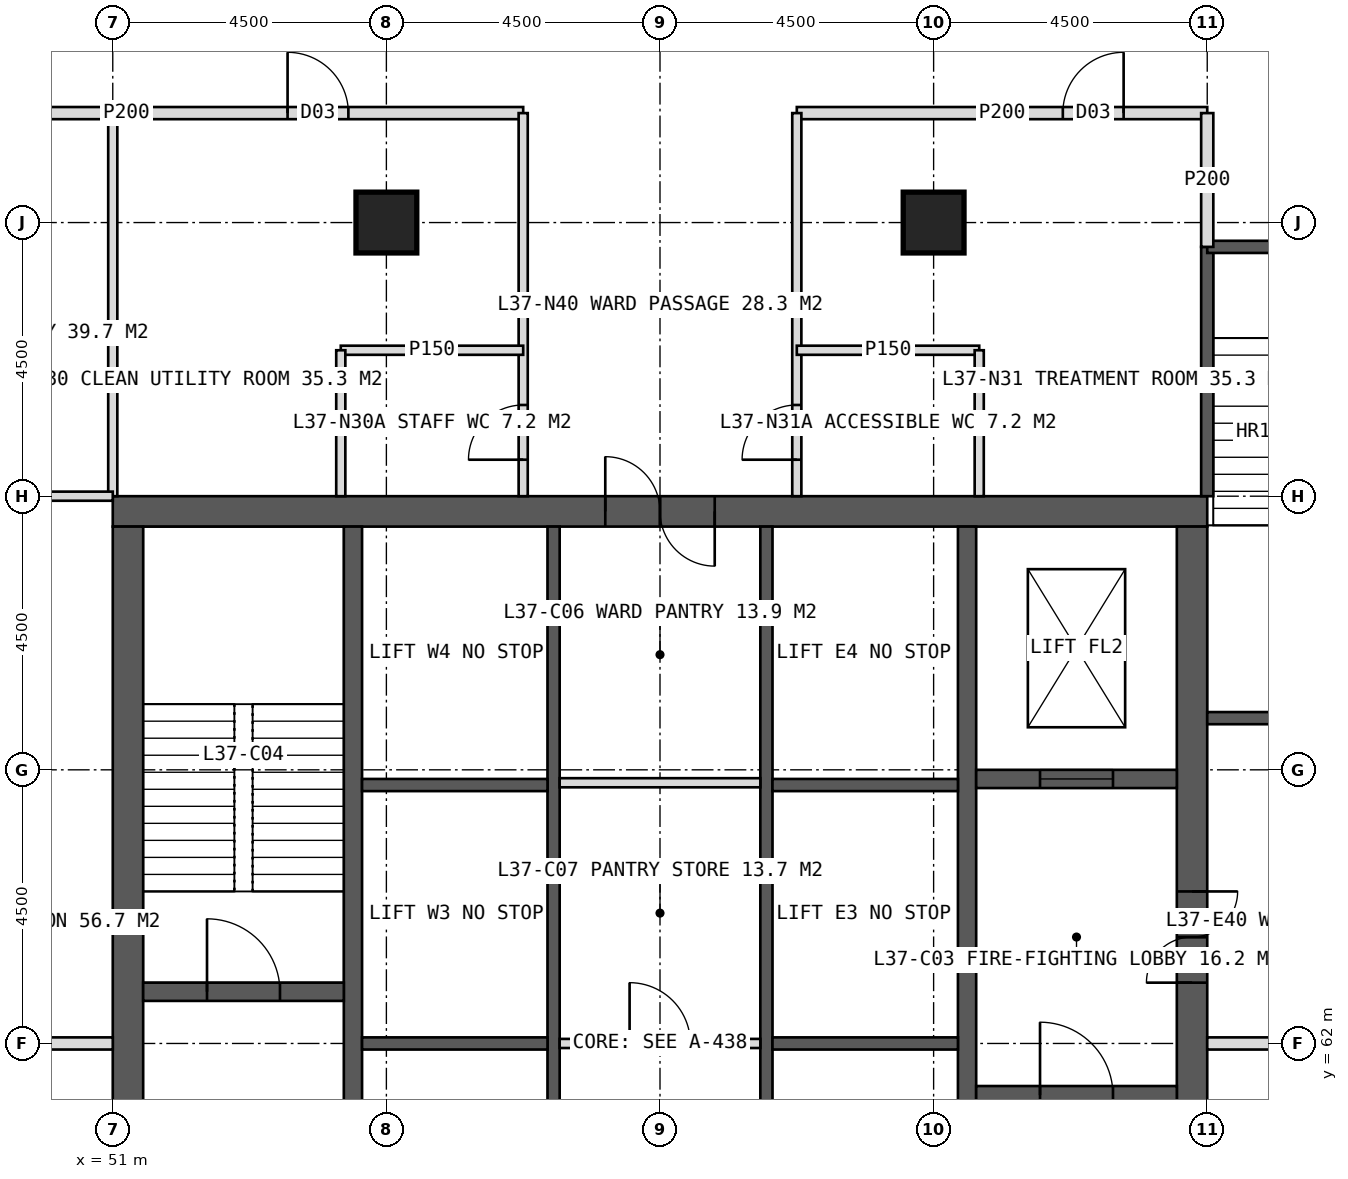
"""IFC4 building model, lengths in metres.
Left out: names, types, materials, properties, quantities, classifications, styles, units other than length and angle.
Written with IfcOpenShell. Run it as: python <this file> out.ifc"""

import sys

from ifc_helpers import new_model, si_unit, direction, frame, frame_2d, origin, origin_2d, place, context, subcontext, project, spatial, rectangle, hollow_rectangle, extrude, element, fill, save


model = new_model("IFC4")
c1 = context("Model", 3, precision=1e-05, world=origin(), true_north=direction((0.0, 1.0)))
c2 = subcontext(c1, "Body", "Model", "MODEL_VIEW")
j1 = project(units=[si_unit("LENGTHUNIT", "METRE"), si_unit("PLANEANGLEUNIT", "RADIAN")], contexts=[c1])
p1 = place(None, origin())
s1 = spatial("IfcSite", under=j1, at=p1, CompositionType="ELEMENT")
p2 = place(p1, origin())
s2 = spatial("IfcBuilding", under=s1, at=p2, CompositionType="ELEMENT")
p3 = place(p2, frame((0.0, 0.0, 156.0)))
s3 = spatial("IfcBuildingStorey", under=s2, at=p3, CompositionType="ELEMENT", Elevation=156.0)
p4 = place(p3, frame((51.0, 70.75, 0.0), z_axis=(0.0, 0.0, 1.0), x_axis=(1.0, 0.0, 0.0)))
e1 = element("IfcWall", 1, at=p4, inside=s3, PredefinedType="SHEAR", context=c2, shape_type="SweptSolid", body=[
    extrude(rectangle(XDim=18.0, YDim=0.5, at=frame_2d((9.0, 0.0))), origin(), (0.0, 0.0, 1.0), 4.0),
])
p5 = place(p4, frame((8.1, 0.0, 0.0)))
e2 = element("IfcOpeningElement", 2, at=p5, cuts=e1, PredefinedType="OPENING", context=c2, shape_type="SweptSolid", body=[
    extrude(rectangle(XDim=1.8, YDim=2.2, at=frame_2d((0.9, 1.1))), frame((0.0, 0.26, 0.0), z_axis=(0.0, -1.0, 0.0), x_axis=(1.0, 0.0, 0.0)), (0.0, 0.0, 1.0), 0.52),
])
p6 = place(p3, frame((51.25, 53.5, 0.0), z_axis=(0.0, 0.0, 1.0), x_axis=(0.0, 1.0, 0.0)))
e3 = element("IfcWall", 3, at=p6, inside=s3, PredefinedType="SHEAR", context=c2, shape_type="SweptSolid", body=[
    extrude(rectangle(XDim=17.0, YDim=0.5, at=frame_2d((8.5, 0.0))), origin(), (0.0, 0.0, 1.0), 4.0),
])
p7 = place(p6, frame((6.0, 0.0, 0.0)))
e4 = element("IfcOpeningElement", 4, at=p7, cuts=e3, PredefinedType="OPENING", context=c2, shape_type="SweptSolid", body=[
    extrude(rectangle(XDim=1.5, YDim=2.2, at=frame_2d((0.75, 1.1))), frame((0.0, 0.26, 0.0), z_axis=(0.0, -1.0, 0.0), x_axis=(1.0, 0.0, 0.0)), (0.0, 0.0, 1.0), 0.52),
])
p8 = place(p3, frame((68.75, 53.5, 0.0), z_axis=(0.0, 0.0, 1.0), x_axis=(0.0, 1.0, 0.0)))
e5 = element("IfcWall", 5, at=p8, inside=s3, PredefinedType="SHEAR", context=c2, shape_type="SweptSolid", body=[
    extrude(rectangle(XDim=17.0, YDim=0.5, at=frame_2d((8.5, 0.0))), origin(), (0.0, 0.0, 1.0), 4.0),
])
p9 = place(p8, frame((9.5, 0.0, 0.0)))
e6 = element("IfcOpeningElement", 6, at=p9, cuts=e5, PredefinedType="OPENING", context=c2, shape_type="SweptSolid", body=[
    extrude(rectangle(XDim=1.5, YDim=2.2, at=frame_2d((0.75, 1.1))), frame((0.0, 0.26, 0.0), z_axis=(0.0, -1.0, 0.0), x_axis=(1.0, 0.0, 0.0)), (0.0, 0.0, 1.0), 0.52),
])
for number, where, z_axis, x_axis in (
    (7, (54.95, 53.5, 0.0), (0.0, 0.0, 1.0), (0.0, 1.0, 0.0)),
    (8, (65.05, 53.5, 0.0), (0.0, 0.0, 1.0), (0.0, 1.0, 0.0)),
):
    element("IfcWall", number, at=place(p3, frame(where, z_axis=z_axis, x_axis=x_axis)), inside=s3, PredefinedType="SHEAR", context=c2, shape_type="SweptSolid", body=[
        extrude(rectangle(XDim=17.0, YDim=0.3, at=frame_2d((8.5, 0.0))), origin(), (0.0, 0.0, 1.0), 4.0),
    ])
p10 = place(p3, frame((58.25, 53.5, 0.0), z_axis=(0.0, 0.0, 1.0), x_axis=(0.0, 1.0, 0.0)))
e9 = element("IfcWall", 9, at=p10, inside=s3, PredefinedType="SHEAR", context=c2, shape_type="SweptSolid", body=[
    extrude(rectangle(XDim=17.0, YDim=0.2, at=frame_2d((8.5, 0.0))), origin(), (0.0, 0.0, 1.0), 4.0),
])
p11 = place(p10, frame((1.375, 0.0, 0.0)))
e10 = element("IfcOpeningElement", 10, at=p11, cuts=e9, PredefinedType="OPENING", context=c2, shape_type="SweptSolid", body=[
    extrude(rectangle(XDim=1.4, YDim=2.2, at=frame_2d((0.7, 1.1))), frame((0.0, 0.11, 0.0), z_axis=(0.0, -1.0, 0.0), x_axis=(1.0, 0.0, 0.0)), (0.0, 0.0, 1.0), 0.22),
])
p12 = place(p10, frame((5.675, 0.0, 0.0)))
e11 = element("IfcOpeningElement", 11, at=p12, cuts=e9, PredefinedType="OPENING", context=c2, shape_type="SweptSolid", body=[
    extrude(rectangle(XDim=1.4, YDim=2.2, at=frame_2d((0.7, 1.1))), frame((0.0, 0.11, 0.0), z_axis=(0.0, -1.0, 0.0), x_axis=(1.0, 0.0, 0.0)), (0.0, 0.0, 1.0), 0.22),
])
p13 = place(p3, frame((61.75, 53.5, 0.0), z_axis=(0.0, 0.0, 1.0), x_axis=(0.0, 1.0, 0.0)))
e12 = element("IfcWall", 12, at=p13, inside=s3, PredefinedType="SHEAR", context=c2, shape_type="SweptSolid", body=[
    extrude(rectangle(XDim=17.0, YDim=0.2, at=frame_2d((8.5, 0.0))), origin(), (0.0, 0.0, 1.0), 4.0),
])
p14 = place(p13, frame((1.375, 0.0, 0.0)))
e13 = element("IfcOpeningElement", 13, at=p14, cuts=e12, PredefinedType="OPENING", context=c2, shape_type="SweptSolid", body=[
    extrude(rectangle(XDim=1.4, YDim=2.2, at=frame_2d((0.7, 1.1))), frame((0.0, 0.11, 0.0), z_axis=(0.0, -1.0, 0.0), x_axis=(1.0, 0.0, 0.0)), (0.0, 0.0, 1.0), 0.22),
])
p15 = place(p13, frame((5.675, 0.0, 0.0)))
e14 = element("IfcOpeningElement", 14, at=p15, cuts=e12, PredefinedType="OPENING", context=c2, shape_type="SweptSolid", body=[
    extrude(rectangle(XDim=1.4, YDim=2.2, at=frame_2d((0.7, 1.1))), frame((0.0, 0.11, 0.0), z_axis=(0.0, -1.0, 0.0), x_axis=(1.0, 0.0, 0.0)), (0.0, 0.0, 1.0), 0.22),
])
for number, where, z_axis, x_axis in (
    (15, (55.1, 62.0, 0.0), (0.0, 0.0, 1.0), (1.0, 0.0, 0.0)),
    (16, (61.85, 62.0, 0.0), (0.0, 0.0, 1.0), (1.0, 0.0, 0.0)),
    (17, (55.1, 66.25, 0.0), (0.0, 0.0, 1.0), (1.0, 0.0, 0.0)),
    (18, (61.85, 66.25, 0.0), (0.0, 0.0, 1.0), (1.0, 0.0, 0.0)),
):
    element("IfcWall", number, at=place(p3, frame(where, z_axis=z_axis, x_axis=x_axis)), inside=s3, PredefinedType="SHEAR", context=c2, shape_type="SweptSolid", body=[
        extrude(rectangle(XDim=3.05, YDim=0.2, at=frame_2d((1.525, 0.0))), origin(), (0.0, 0.0, 1.0), 4.0),
    ])
p16 = place(p3, frame((51.5, 62.85, 0.0), z_axis=(0.0, 0.0, 1.0), x_axis=(1.0, 0.0, 0.0)))
e19 = element("IfcWall", 19, at=p16, inside=s3, PredefinedType="SHEAR", context=c2, shape_type="SweptSolid", body=[
    extrude(rectangle(XDim=3.3, YDim=0.3, at=frame_2d((1.65, 0.0))), origin(), (0.0, 0.0, 1.0), 4.0),
])
p17 = place(p16, frame((1.05, 0.0, 0.0)))
e20 = element("IfcOpeningElement", 20, at=p17, cuts=e19, PredefinedType="OPENING", context=c2, shape_type="SweptSolid", body=[
    extrude(rectangle(XDim=1.2, YDim=2.1, at=frame_2d((0.6, 1.05))), frame((0.0, 0.16, 0.0), z_axis=(0.0, -1.0, 0.0), x_axis=(1.0, 0.0, 0.0)), (0.0, 0.0, 1.0), 0.32),
])
p18 = place(p3, frame((65.2, 61.15, 0.0), z_axis=(0.0, 0.0, 1.0), x_axis=(1.0, 0.0, 0.0)))
e21 = element("IfcWall", 21, at=p18, inside=s3, PredefinedType="SHEAR", context=c2, shape_type="SweptSolid", body=[
    extrude(rectangle(XDim=3.3, YDim=0.3, at=frame_2d((1.65, 0.0))), origin(), (0.0, 0.0, 1.0), 4.0),
])
p19 = place(p18, frame((1.05, 0.0, 0.0)))
e22 = element("IfcOpeningElement", 22, at=p19, cuts=e21, PredefinedType="OPENING", context=c2, shape_type="SweptSolid", body=[
    extrude(rectangle(XDim=1.2, YDim=2.1, at=frame_2d((0.6, 1.05))), frame((0.0, 0.16, 0.0), z_axis=(0.0, -1.0, 0.0), x_axis=(1.0, 0.0, 0.0)), (0.0, 0.0, 1.0), 0.32),
])
p20 = place(p3, frame((65.2, 66.35, 0.0), z_axis=(0.0, 0.0, 1.0), x_axis=(1.0, 0.0, 0.0)))
e23 = element("IfcWall", 23, at=p20, inside=s3, PredefinedType="SHEAR", context=c2, shape_type="SweptSolid", body=[
    extrude(rectangle(XDim=3.3, YDim=0.3, at=frame_2d((1.65, 0.0))), origin(), (0.0, 0.0, 1.0), 4.0),
])
p21 = place(p20, frame((1.05, 0.0, 0.0)))
e24 = element("IfcOpeningElement", 24, at=p21, cuts=e23, PredefinedType="OPENING", context=c2, shape_type="SweptSolid", body=[
    extrude(rectangle(XDim=1.2, YDim=2.2, at=frame_2d((0.6, 1.1))), frame((0.0, 0.16, 0.0), z_axis=(0.0, -1.0, 0.0), x_axis=(1.0, 0.0, 0.0)), (0.0, 0.0, 1.0), 0.32),
])
for number, where, z_axis, x_axis in (
    (25, (55.5, 75.5, 0.0), (0.0, 0.0, 1.0), (1.0, 0.0, 0.0)),
    (26, (64.5, 75.5, 0.0), (0.0, 0.0, 1.0), (1.0, 0.0, 0.0)),
):
    element("IfcColumn", number, at=place(p3, frame(where, z_axis=z_axis, x_axis=x_axis)), inside=s3, PredefinedType="COLUMN", context=c2, shape_type="SweptSolid", body=[
        extrude(hollow_rectangle(XDim=1.0, YDim=1.0, WallThickness=0.1, at=origin_2d()), origin(), (0.0, 0.0, 1.0), 4.0),
    ])
p22 = place(p3, frame((51.0, 71.0, 0.0), z_axis=(0.0, 0.0, 1.0), x_axis=(0.0, 1.0, 0.0)))
e27 = element("IfcWall", 27, at=p22, inside=s3, PredefinedType="PARTITIONING", context=c2, shape_type="SweptSolid", body=[
    extrude(rectangle(XDim=6.3, YDim=0.15, at=frame_2d((3.15, 0.0))), origin(), (0.0, 0.0, 1.0), 3.75),
])
p23 = place(p3, frame((44.7, 77.3, 0.0), z_axis=(0.0, 0.0, 1.0), x_axis=(1.0, 0.0, 0.0)))
e28 = element("IfcWall", 28, at=p23, inside=s3, PredefinedType="PARTITIONING", context=c2, shape_type="SweptSolid", body=[
    extrude(rectangle(XDim=13.05, YDim=0.2, at=frame_2d((6.525, 0.0))), origin(), (0.0, 0.0, 1.0), 3.75),
])
p24 = place(p23, frame((9.175, 0.0, 0.0)))
e29 = element("IfcOpeningElement", 29, at=p24, cuts=e28, PredefinedType="OPENING", context=c2, shape_type="SweptSolid", body=[
    extrude(rectangle(XDim=1.0, YDim=2.1, at=frame_2d((0.5, 1.05))), frame((0.0, 0.11, 0.0), z_axis=(0.0, -1.0, 0.0), x_axis=(1.0, 0.0, 0.0)), (0.0, 0.0, 1.0), 0.22),
])
p25 = place(p3, frame((62.25, 77.3, 0.0), z_axis=(0.0, 0.0, 1.0), x_axis=(1.0, 0.0, 0.0)))
e30 = element("IfcWall", 30, at=p25, inside=s3, PredefinedType="PARTITIONING", context=c2, shape_type="SweptSolid", body=[
    extrude(rectangle(XDim=6.75, YDim=0.2, at=frame_2d((3.375, 0.0))), origin(), (0.0, 0.0, 1.0), 3.75),
])
p26 = place(p25, frame((4.375, 0.0, 0.0)))
e31 = element("IfcOpeningElement", 31, at=p26, cuts=e30, PredefinedType="OPENING", context=c2, shape_type="SweptSolid", body=[
    extrude(rectangle(XDim=1.0, YDim=2.1, at=frame_2d((0.5, 1.05))), frame((0.0, 0.11, 0.0), z_axis=(0.0, -1.0, 0.0), x_axis=(1.0, 0.0, 0.0)), (0.0, 0.0, 1.0), 0.22),
])
p27 = place(p3, frame((57.75, 71.0, 0.0), z_axis=(0.0, 0.0, 1.0), x_axis=(0.0, 1.0, 0.0)))
e32 = element("IfcWall", 32, at=p27, inside=s3, PredefinedType="PARTITIONING", context=c2, shape_type="SweptSolid", body=[
    extrude(rectangle(XDim=6.3, YDim=0.15, at=frame_2d((3.15, 0.0))), origin(), (0.0, 0.0, 1.0), 3.75),
])
p28 = place(p27, frame((0.6, 0.0, 0.0)))
e33 = element("IfcOpeningElement", 33, at=p28, cuts=e32, PredefinedType="OPENING", context=c2, shape_type="SweptSolid", body=[
    extrude(rectangle(XDim=0.9, YDim=2.1, at=frame_2d((0.45, 1.05))), frame((0.0, 0.085, 0.0), z_axis=(0.0, -1.0, 0.0), x_axis=(1.0, 0.0, 0.0)), (0.0, 0.0, 1.0), 0.17),
])
p29 = place(p3, frame((62.25, 71.0, 0.0), z_axis=(0.0, 0.0, 1.0), x_axis=(0.0, 1.0, 0.0)))
e34 = element("IfcWall", 34, at=p29, inside=s3, PredefinedType="PARTITIONING", context=c2, shape_type="SweptSolid", body=[
    extrude(rectangle(XDim=6.3, YDim=0.15, at=frame_2d((3.15, 0.0))), origin(), (0.0, 0.0, 1.0), 3.75),
])
p30 = place(p29, frame((0.6, 0.0, 0.0)))
e35 = element("IfcOpeningElement", 35, at=p30, cuts=e34, PredefinedType="OPENING", context=c2, shape_type="SweptSolid", body=[
    extrude(rectangle(XDim=0.9, YDim=2.1, at=frame_2d((0.45, 1.05))), frame((0.0, 0.085, 0.0), z_axis=(0.0, -1.0, 0.0), x_axis=(1.0, 0.0, 0.0)), (0.0, 0.0, 1.0), 0.17),
])
p31 = place(p3, frame((54.75, 73.4, 0.0), z_axis=(0.0, 0.0, 1.0), x_axis=(1.0, 0.0, 0.0)))
e36 = element("IfcWall", 36, at=p31, inside=s3, PredefinedType="PARTITIONING", context=c2, shape_type="SweptSolid", body=[
    extrude(rectangle(XDim=3.0, YDim=0.15, at=frame_2d((1.5, 0.0))), origin(), (0.0, 0.0, 1.0), 3.75),
])
p32 = place(p3, frame((54.75, 71.0, 0.0), z_axis=(0.0, 0.0, 1.0), x_axis=(0.0, 1.0, 0.0)))
e37 = element("IfcWall", 37, at=p32, inside=s3, PredefinedType="PARTITIONING", context=c2, shape_type="SweptSolid", body=[
    extrude(rectangle(XDim=2.4, YDim=0.15, at=frame_2d((1.2, 0.0))), origin(), (0.0, 0.0, 1.0), 3.75),
])
p33 = place(p3, frame((62.25, 73.4, 0.0), z_axis=(0.0, 0.0, 1.0), x_axis=(1.0, 0.0, 0.0)))
e38 = element("IfcWall", 38, at=p33, inside=s3, PredefinedType="PARTITIONING", context=c2, shape_type="SweptSolid", body=[
    extrude(rectangle(XDim=3.0, YDim=0.15, at=frame_2d((1.5, 0.0))), origin(), (0.0, 0.0, 1.0), 3.75),
])
p34 = place(p3, frame((65.25, 71.0, 0.0), z_axis=(0.0, 0.0, 1.0), x_axis=(0.0, 1.0, 0.0)))
e39 = element("IfcWall", 39, at=p34, inside=s3, PredefinedType="PARTITIONING", context=c2, shape_type="SweptSolid", body=[
    extrude(rectangle(XDim=2.4, YDim=0.15, at=frame_2d((1.2, 0.0))), origin(), (0.0, 0.0, 1.0), 3.75),
])
p35 = place(p3, frame((51.0, 62.0, 0.0), z_axis=(0.0, 0.0, 1.0), x_axis=(-1.0, 0.0, 0.0)))
e40 = element("IfcWall", 40, at=p35, inside=s3, PredefinedType="SOLIDWALL", context=c2, shape_type="SweptSolid", body=[
    extrude(rectangle(XDim=6.3, YDim=0.2, at=frame_2d((3.15, 0.0))), origin(), (0.0, 0.0, 1.0), 2.95),
])
p36 = place(p3, frame((51.0, 71.0, 0.0), z_axis=(0.0, 0.0, 1.0), x_axis=(-1.0, 0.0, 0.0)))
e41 = element("IfcWall", 41, at=p36, inside=s3, PredefinedType="PARTITIONING", context=c2, shape_type="SweptSolid", body=[
    extrude(rectangle(XDim=6.3, YDim=0.15, at=frame_2d((3.15, 0.0))), origin(), (0.0, 0.0, 1.0), 3.75),
])
p37 = place(p3, frame((69.0, 62.0, 0.0), z_axis=(0.0, 0.0, 1.0), x_axis=(1.0, 0.0, 0.0)))
e42 = element("IfcWall", 42, at=p37, inside=s3, PredefinedType="SOLIDWALL", context=c2, shape_type="SweptSolid", body=[
    extrude(rectangle(XDim=6.3, YDim=0.2, at=frame_2d((3.15, 0.0))), origin(), (0.0, 0.0, 1.0), 2.95),
])
p38 = place(p3, frame((58.35, 62.0, 0.0), z_axis=(0.0, 0.0, 1.0), x_axis=(1.0, 0.0, 0.0)))
e43 = element("IfcWall", 43, at=p38, inside=s3, PredefinedType="PARTITIONING", context=c2, shape_type="SweptSolid", body=[
    extrude(rectangle(XDim=3.3, YDim=0.15, at=frame_2d((1.65, 0.0))), origin(), (0.0, 0.0, 1.0), 3.75),
])
p39 = place(p38, frame((1.15, 0.0, 0.0)))
e44 = element("IfcOpeningElement", 44, at=p39, cuts=e43, PredefinedType="OPENING", context=c2, shape_type="SweptSolid", body=[
    extrude(rectangle(XDim=1.0, YDim=2.1, at=frame_2d((0.5, 1.05))), frame((0.0, 0.085, 0.0), z_axis=(0.0, -1.0, 0.0), x_axis=(1.0, 0.0, 0.0)), (0.0, 0.0, 1.0), 0.17),
])
p40 = place(p3, frame((58.35, 66.288, 0.0), z_axis=(0.0, 0.0, 1.0), x_axis=(1.0, 0.0, 0.0)))
e45 = element("IfcWall", 45, at=p40, inside=s3, PredefinedType="PARTITIONING", context=c2, shape_type="SweptSolid", body=[
    extrude(rectangle(XDim=3.3, YDim=0.15, at=frame_2d((1.65, 0.0))), origin(), (0.0, 0.0, 1.0), 3.75),
])
p41 = place(p3, frame((69.0, 71.0, 0.0), z_axis=(0.0, 0.0, 1.0), x_axis=(0.0, 1.0, 0.0)))
e46 = element("IfcWall", 46, at=p41, inside=s3, PredefinedType="SOLIDWALL", context=c2, shape_type="SweptSolid", body=[
    extrude(rectangle(XDim=4.1, YDim=0.2, at=frame_2d((2.05, 0.0))), origin(), (0.0, 0.0, 1.0), 3.75),
])
p42 = place(p3, frame((69.0, 67.35, 0.0), z_axis=(0.0, 0.0, 1.0), x_axis=(1.0, 0.0, 0.0)))
e47 = element("IfcWall", 47, at=p42, inside=s3, PredefinedType="SOLIDWALL", context=c2, shape_type="SweptSolid", body=[
    extrude(rectangle(XDim=3.5, YDim=0.2, at=frame_2d((1.75, 0.0))), origin(), (0.0, 0.0, 1.0), 3.75),
])
p43 = place(p3, frame((69.0, 75.1, 0.0), z_axis=(0.0, 0.0, 1.0), x_axis=(1.0, 0.0, 0.0)))
e48 = element("IfcWall", 48, at=p43, inside=s3, PredefinedType="SOLIDWALL", context=c2, shape_type="SweptSolid", body=[
    extrude(rectangle(XDim=3.5, YDim=0.2, at=frame_2d((1.75, 0.0))), origin(), (0.0, 0.0, 1.0), 3.75),
])
p44 = place(p43, frame((1.15, 0.0, 0.0)))
e49 = element("IfcOpeningElement", 49, at=p44, cuts=e48, PredefinedType="OPENING", context=c2, shape_type="SweptSolid", body=[
    extrude(rectangle(XDim=1.2, YDim=2.1, at=frame_2d((0.6, 1.05))), frame((0.0, 0.11, 0.0), z_axis=(0.0, -1.0, 0.0), x_axis=(1.0, 0.0, 0.0)), (0.0, 0.0, 1.0), 0.22),
])
p45 = place(p3, frame((69.0, 75.1, 0.0), z_axis=(0.0, 0.0, 1.0), x_axis=(0.0, 1.0, 0.0)))
e50 = element("IfcWall", 50, at=p45, inside=s3, PredefinedType="PARTITIONING", context=c2, shape_type="SweptSolid", body=[
    extrude(rectangle(XDim=2.2, YDim=0.2, at=frame_2d((1.1, 0.0))), origin(), (0.0, 0.0, 1.0), 3.75),
])
p46 = place(p28, origin())
e51 = element("IfcDoor", 51, at=p46, inside=s3, OperationType="SINGLE_SWING_LEFT", PredefinedType="DOOR", context=c2, shape_type="SweptSolid", body=[
    extrude(rectangle(XDim=0.9, YDim=2.1, at=frame_2d((0.45, 1.05))), frame((0.0, 0.025, 0.0), z_axis=(0.0, -1.0, 0.0), x_axis=(1.0, 0.0, 0.0)), (0.0, 0.0, 1.0), 0.05),
])
fill(e33, e51)
p47 = place(p24, origin())
e52 = element("IfcDoor", 52, at=p47, inside=s3, OperationType="SINGLE_SWING_LEFT", PredefinedType="DOOR", context=c2, shape_type="SweptSolid", body=[
    extrude(rectangle(XDim=1.0, YDim=2.1, at=frame_2d((0.5, 1.05))), frame((0.0, 0.025, 0.0), z_axis=(0.0, -1.0, 0.0), x_axis=(1.0, 0.0, 0.0)), (0.0, 0.0, 1.0), 0.05),
])
fill(e29, e52)
p48 = place(p30, origin())
e53 = element("IfcDoor", 53, at=p48, inside=s3, OperationType="SINGLE_SWING_LEFT", PredefinedType="DOOR", context=c2, shape_type="SweptSolid", body=[
    extrude(rectangle(XDim=0.9, YDim=2.1, at=frame_2d((0.45, 1.05))), frame((0.0, 0.025, 0.0), z_axis=(0.0, -1.0, 0.0), x_axis=(1.0, 0.0, 0.0)), (0.0, 0.0, 1.0), 0.05),
])
fill(e35, e53)
p49 = place(p26, origin())
e54 = element("IfcDoor", 54, at=p49, inside=s3, OperationType="SINGLE_SWING_RIGHT", PredefinedType="DOOR", context=c2, shape_type="SweptSolid", body=[
    extrude(rectangle(XDim=1.0, YDim=2.1, at=frame_2d((0.5, 1.05))), frame((0.0, 0.025, 0.0), z_axis=(0.0, -1.0, 0.0), x_axis=(1.0, 0.0, 0.0)), (0.0, 0.0, 1.0), 0.05),
])
fill(e31, e54)
p50 = place(p9, origin())
e55 = element("IfcDoor", 55, at=p50, inside=s3, OperationType="DOUBLE_DOOR_SINGLE_SWING", PredefinedType="DOOR", context=c2, shape_type="SweptSolid", body=[
    extrude(rectangle(XDim=1.5, YDim=2.2, at=frame_2d((0.75, 1.1))), frame((0.0, 0.025, 0.0), z_axis=(0.0, -1.0, 0.0), x_axis=(1.0, 0.0, 0.0)), (0.0, 0.0, 1.0), 0.05),
])
fill(e6, e55)
p51 = place(p17, origin())
e56 = element("IfcDoor", 56, at=p51, inside=s3, OperationType="SINGLE_SWING_LEFT", PredefinedType="DOOR", context=c2, shape_type="SweptSolid", body=[
    extrude(rectangle(XDim=1.2, YDim=2.1, at=frame_2d((0.6, 1.05))), frame((0.0, 0.025, 0.0), z_axis=(0.0, -1.0, 0.0), x_axis=(1.0, 0.0, 0.0)), (0.0, 0.0, 1.0), 0.05),
])
fill(e20, e56)
p52 = place(p19, origin())
e57 = element("IfcDoor", 57, at=p52, inside=s3, OperationType="SINGLE_SWING_LEFT", PredefinedType="DOOR", context=c2, shape_type="SweptSolid", body=[
    extrude(rectangle(XDim=1.2, YDim=2.1, at=frame_2d((0.6, 1.05))), frame((0.0, 0.025, 0.0), z_axis=(0.0, -1.0, 0.0), x_axis=(1.0, 0.0, 0.0)), (0.0, 0.0, 1.0), 0.05),
])
fill(e22, e57)
p53 = place(p21, origin())
e58 = element("IfcDoor", 58, at=p53, inside=s3, OperationType="SLIDING_TO_LEFT", PredefinedType="DOOR", context=c2, shape_type="SweptSolid", body=[
    extrude(rectangle(XDim=1.2, YDim=2.2, at=frame_2d((0.6, 1.1))), frame((0.0, 0.025, 0.0), z_axis=(0.0, -1.0, 0.0), x_axis=(1.0, 0.0, 0.0)), (0.0, 0.0, 1.0), 0.05),
])
fill(e24, e58)
p54 = place(p39, origin())
e59 = element("IfcDoor", 59, at=p54, inside=s3, OperationType="SINGLE_SWING_LEFT", PredefinedType="DOOR", context=c2, shape_type="SweptSolid", body=[
    extrude(rectangle(XDim=1.0, YDim=2.1, at=frame_2d((0.5, 1.05))), frame((0.0, 0.025, 0.0), z_axis=(0.0, -1.0, 0.0), x_axis=(1.0, 0.0, 0.0)), (0.0, 0.0, 1.0), 0.05),
])
fill(e44, e59)
p55 = place(p5, origin())
e60 = element("IfcDoor", 60, at=p55, inside=s3, OperationType="DOUBLE_DOOR_SINGLE_SWING", PredefinedType="DOOR", context=c2, shape_type="SweptSolid", body=[
    extrude(rectangle(XDim=1.8, YDim=2.2, at=frame_2d((0.9, 1.1))), frame((0.0, 0.025, 0.0), z_axis=(0.0, -1.0, 0.0), x_axis=(1.0, 0.0, 0.0)), (0.0, 0.0, 1.0), 0.05),
])
fill(e2, e60)
save(model, sys.argv[1])
